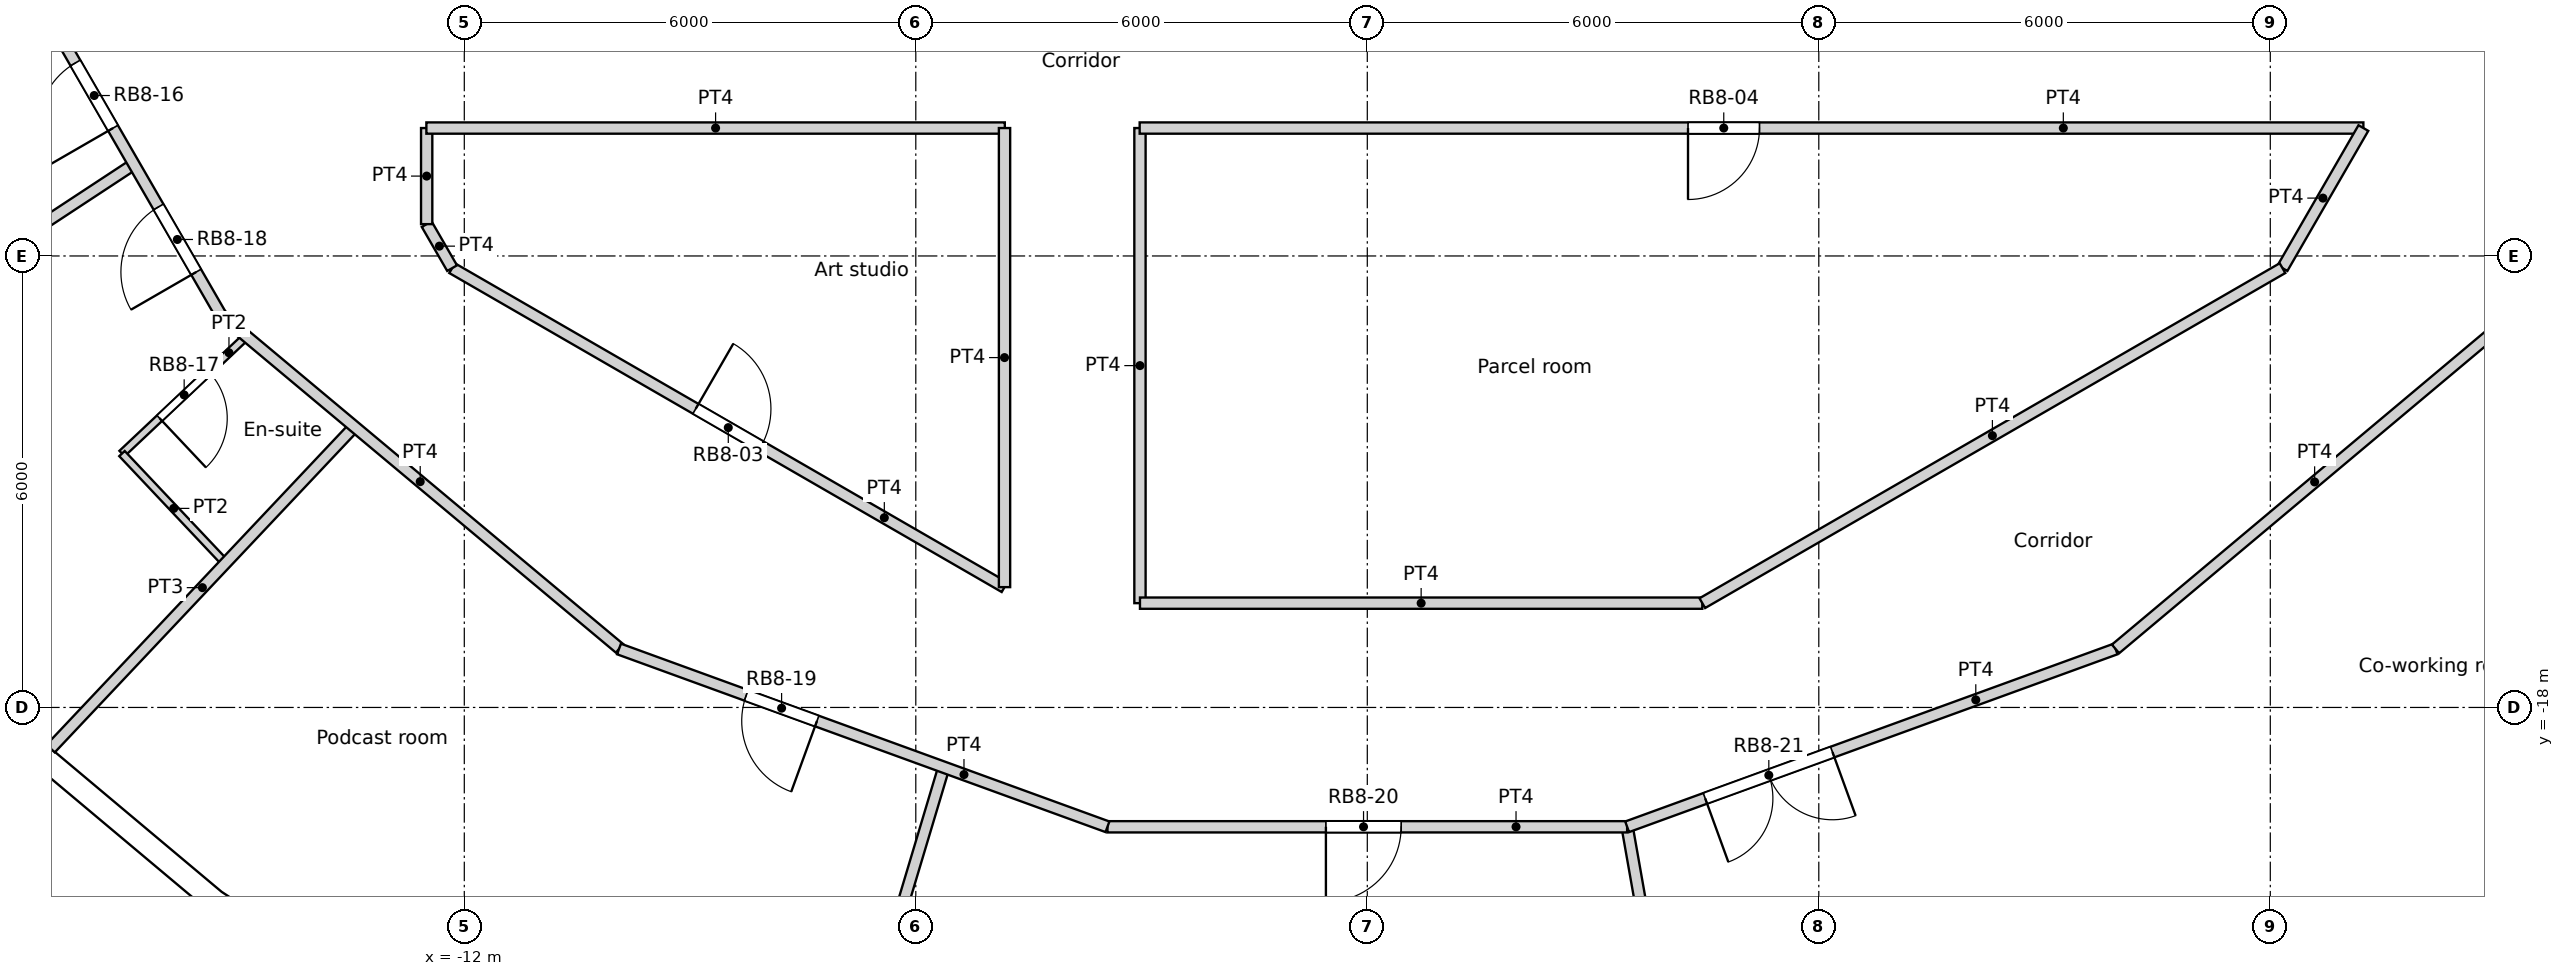
"""IFC4 building model, lengths in metres.
Left out: names, types, materials, properties, quantities, classifications, styles, units other than length and angle.
Written with IfcOpenShell. Run it as: python <this file> out.ifc"""

import sys

from ifc_helpers import new_model, si_unit, direction, frame, frame_2d, origin, origin_2d, place, context, subcontext, project, spatial, rectangle, circle, extrude, element, fill, save


model = new_model("IFC4")
c1 = context("Model", 3, precision=1e-05, world=origin(), true_north=direction((0.0, 1.0)))
c2 = subcontext(c1, "Body", "Model", "MODEL_VIEW")
j1 = project(units=[si_unit("LENGTHUNIT", "METRE"), si_unit("PLANEANGLEUNIT", "RADIAN")], contexts=[c1])
p1 = place(None, origin())
s1 = spatial("IfcSite", under=j1, at=p1, CompositionType="ELEMENT")
p2 = place(p1, origin())
s2 = spatial("IfcBuilding", under=s1, at=p2, CompositionType="ELEMENT")
p3 = place(p2, frame((0.0, 0.0, 201.6)))
s3 = spatial("IfcBuildingStorey", under=s2, at=p3, CompositionType="ELEMENT", Elevation=201.6)
for number, where, z_axis, x_axis in (
    (1, (-16.846, -17.855, 0.0), (0.0, 0.0, 1.0), (1.0, 0.0, 0.0)),
    (2, (14.659, -19.69, 0.0), (0.0, 0.0, 1.0), (1.0, 0.0, 0.0)),
):
    element("IfcColumn", number, at=place(p3, frame(where, z_axis=z_axis, x_axis=x_axis)), inside=s3, PredefinedType="COLUMN", context=c2, shape_type="SweptSolid", body=[
        extrude(circle(Radius=0.6, at=origin_2d()), origin(), (0.0, 0.0, 1.0), 3.6),
    ])
for number, where, z_axis, x_axis in (
    (3, (-13.798, -12.802, 0.0), (0.0, 0.0, 1.0), (1.0, 0.0, 0.0)),
    (4, (-9.411, -16.301, 0.0), (0.0, 0.0, 1.0), (1.0, 0.0, 0.0)),
    (5, (-4.188, -18.35, 0.0), (0.0, 0.0, 1.0), (1.0, 0.0, 0.0)),
    (6, (1.406, -18.77, 0.0), (0.0, 0.0, 1.0), (1.0, 0.0, 0.0)),
    (7, (6.876, -17.521, 0.0), (0.0, 0.0, 1.0), (1.0, 0.0, 0.0)),
    (8, (11.735, -14.716, 0.0), (0.0, 0.0, 1.0), (1.0, 0.0, 0.0)),
):
    element("IfcColumn", number, at=place(p3, frame(where, z_axis=z_axis, x_axis=x_axis)), inside=s3, PredefinedType="COLUMN", context=c2, shape_type="SweptSolid", body=[
        extrude(circle(Radius=0.65, at=origin_2d()), origin(), (0.0, 0.0, 1.0), 3.6),
    ])
p4 = place(p3, frame((-17.593, -18.661, 0.0), z_axis=(0.0, 0.0, 1.0), x_axis=(0.766008913364, -0.642829950023, 0.0)))
e9 = element("IfcWall", 9, at=p4, inside=s3, PredefinedType="SOLIDWALL", context=c2, shape_type="SweptSolid", body=[
    extrude(rectangle(XDim=2.973, YDim=0.3, at=frame_2d((1.486, 0.0))), origin(), (0.0, 0.0, 1.0), 3.3),
])
p5 = place(p4, frame((1.486, 0.0, 1.55)))
e10 = element("IfcOpeningElement", 10, at=p5, cuts=e9, PredefinedType="OPENING", context=c2, shape_type="SweptSolid", body=[
    extrude(circle(Radius=0.9, at=origin_2d()), frame((0.0, 0.16, 0.0), z_axis=(0.0, -1.0, 0.0), x_axis=(1.0, 0.0, 0.0)), (0.0, 0.0, 1.0), 0.32),
])
p6 = place(p3, frame((-15.316, -20.573, 0.0), z_axis=(0.0, 0.0, 1.0), x_axis=(0.835508361394, -0.54947773207, 0.0)))
e11 = element("IfcWall", 11, at=p6, inside=s3, PredefinedType="SOLIDWALL", context=c2, shape_type="SweptSolid", body=[
    extrude(rectangle(XDim=2.973, YDim=0.3, at=frame_2d((1.486, 0.0))), origin(), (0.0, 0.0, 1.0), 3.3),
])
p7 = place(p6, frame((1.486, 0.0, 1.55)))
e12 = element("IfcOpeningElement", 12, at=p7, cuts=e11, PredefinedType="OPENING", context=c2, shape_type="SweptSolid", body=[
    extrude(circle(Radius=0.9, at=origin_2d()), frame((0.0, 0.16, 0.0), z_axis=(0.0, -1.0, 0.0), x_axis=(1.0, 0.0, 0.0)), (0.0, 0.0, 1.0), 0.32),
])
p8 = place(p3, frame((13.132, -22.697, -0.3), z_axis=(0.0, 0.0, 1.0), x_axis=(0.835514416706, 0.549468524554, 0.0)))
e13 = element("IfcWall", 13, at=p8, inside=s3, PredefinedType="ELEMENTEDWALL", context=c2, shape_type="SweptSolid", body=[
    extrude(rectangle(XDim=3.0, YDim=1.45, at=frame_2d((1.5, 0.0))), origin(), (0.0, 0.0, 1.0), 3.6),
])
p9 = place(p8, frame((1.5, 0.0, 1.85)))
e14 = element("IfcOpeningElement", 14, at=p9, cuts=e13, PredefinedType="OPENING", context=c2, shape_type="SweptSolid", body=[
    extrude(circle(Radius=0.9, at=origin_2d()), frame((0.0, 0.735, 0.0), z_axis=(0.0, -1.0, 0.0), x_axis=(1.0, 0.0, 0.0)), (0.0, 0.0, 1.0), 1.47),
])
p10 = place(p3, frame((-12.504, -10.3, 0.0), z_axis=(0.0, 0.0, 1.0), x_axis=(1.0, 0.0, 0.0)))
e15 = element("IfcWall", 15, at=p10, inside=s3, PredefinedType="PARTITIONING", context=c2, shape_type="SweptSolid", body=[
    extrude(rectangle(XDim=7.687, YDim=0.15, at=frame_2d((3.844, 0.0))), origin(), (0.0, 0.0, 1.0), 3.3),
])
p11 = place(p3, frame((-3.025, -10.3, 0.0), z_axis=(0.0, 0.0, 1.0), x_axis=(1.0, 0.0, 0.0)))
e16 = element("IfcWall", 16, at=p11, inside=s3, PredefinedType="PARTITIONING", context=c2, shape_type="SweptSolid", body=[
    extrude(rectangle(XDim=16.262, YDim=0.15, at=frame_2d((8.131, 0.0))), origin(), (0.0, 0.0, 1.0), 3.3),
])
p12 = place(p11, frame((7.287, 0.0, 0.0)))
e17 = element("IfcOpeningElement", 17, at=p12, cuts=e16, PredefinedType="OPENING", context=c2, shape_type="SweptSolid", body=[
    extrude(rectangle(XDim=0.95, YDim=2.1, at=frame_2d((0.475, 1.05))), frame((0.0, 0.075, 0.0), z_axis=(0.0, -1.0, 0.0), x_axis=(1.0, 0.0, 0.0)), (0.0, 0.0, 1.0), 0.15),
])
p13 = place(p3, frame((12.162, -12.162, 0.0), z_axis=(0.0, 0.0, 1.0), x_axis=(0.499961633463, 0.866047553582, 0.0)))
e18 = element("IfcWall", 18, at=p13, inside=s3, PredefinedType="PARTITIONING", context=c2, shape_type="SweptSolid", body=[
    extrude(rectangle(XDim=2.15, YDim=0.15, at=frame_2d((1.075, 0.0))), origin(), (0.0, 0.0, 1.0), 3.3),
])
p14 = place(p3, frame((9.943, -17.222, 0.0), z_axis=(0.0, 0.0, 1.0), x_axis=(0.766192104565, 0.642611592567, 0.0)))
e19 = element("IfcWall", 19, at=p14, inside=s3, PredefinedType="PARTITIONING", context=c2, shape_type="SweptSolid", body=[
    extrude(rectangle(XDim=6.906, YDim=0.15, at=frame_2d((3.453, 0.0))), origin(), (0.0, 0.0, 1.0), 3.3),
])
p15 = place(p3, frame((-12.5, -11.577, 0.0), z_axis=(0.0, 0.0, 1.0), x_axis=(0.0, 1.0, 0.0)))
e20 = element("IfcWall", 20, at=p15, inside=s3, PredefinedType="PARTITIONING", context=c2, shape_type="SweptSolid", body=[
    extrude(rectangle(XDim=1.277, YDim=0.15, at=frame_2d((0.638, 0.0))), origin(), (0.0, 0.0, 1.0), 3.3),
])
p16 = place(p3, frame((-12.5, -11.577, 0.0), z_axis=(0.0, 0.0, 1.0), x_axis=(0.500024767483, -0.866011103799, 0.0)))
e21 = element("IfcWall", 21, at=p16, inside=s3, PredefinedType="PARTITIONING", context=c2, shape_type="SweptSolid", body=[
    extrude(rectangle(XDim=0.676, YDim=0.15, at=frame_2d((0.338, 0.0))), origin(), (0.0, 0.0, 1.0), 3.3),
])
p17 = place(p3, frame((-18.688, -6.802, 0.0), z_axis=(0.0, 0.0, 1.0), x_axis=(0.500009041241, -0.866020183759, 0.0)))
e22 = element("IfcWall", 22, at=p17, inside=s3, PredefinedType="PARTITIONING", context=c2, shape_type="SweptSolid", body=[
    extrude(rectangle(XDim=6.907, YDim=0.15, at=frame_2d((3.454, 0.0))), origin(), (0.0, 0.0, 1.0), 3.3),
])
p18 = place(p17, frame((3.04, 0.0, 0.0)))
e23 = element("IfcOpeningElement", 23, at=p18, cuts=e22, PredefinedType="OPENING", context=c2, shape_type="SweptSolid", body=[
    extrude(rectangle(XDim=1.0, YDim=2.1, at=frame_2d((0.5, 1.05))), frame((0.0, 0.075, 0.0), z_axis=(0.0, -1.0, 0.0), x_axis=(1.0, 0.0, 0.0)), (0.0, 0.0, 1.0), 0.15),
])
p19 = place(p17, frame((5.249, 0.0, 0.0)))
e24 = element("IfcOpeningElement", 24, at=p19, cuts=e22, PredefinedType="OPENING", context=c2, shape_type="SweptSolid", body=[
    extrude(rectangle(XDim=1.0, YDim=2.1, at=frame_2d((0.5, 1.05))), frame((0.0, 0.075, 0.0), z_axis=(0.0, -1.0, 0.0), x_axis=(1.0, 0.0, 0.0)), (0.0, 0.0, 1.0), 0.15),
])
p20 = place(p3, frame((-15.235, -12.784, 0.0), z_axis=(0.0, 0.0, 1.0), x_axis=(0.767110396068, -0.641515113029, 0.0)))
e25 = element("IfcWall", 25, at=p20, inside=s3, PredefinedType="PARTITIONING", context=c2, shape_type="SweptSolid", body=[
    extrude(rectangle(XDim=6.906, YDim=0.15, at=frame_2d((3.453, 0.0))), origin(), (0.0, 0.0, 1.0), 3.3),
])
p21 = place(p3, frame((-12.162, -12.162, 0.0), z_axis=(0.0, 0.0, 1.0), x_axis=(0.866004766557, -0.500035743023, 0.0)))
e26 = element("IfcWall", 26, at=p21, inside=s3, PredefinedType="PARTITIONING", context=c2, shape_type="SweptSolid", body=[
    extrude(rectangle(XDim=8.477, YDim=0.15, at=frame_2d((4.239, 0.0))), origin(), (0.0, 0.0, 1.0), 3.3),
])
p22 = place(p21, frame((3.738, 0.0, 0.0)))
e27 = element("IfcOpeningElement", 27, at=p22, cuts=e26, PredefinedType="OPENING", context=c2, shape_type="SweptSolid", body=[
    extrude(rectangle(XDim=1.0, YDim=2.04, at=frame_2d((0.5, 1.02))), frame((0.0, 0.075, 0.0), z_axis=(0.0, -1.0, 0.0), x_axis=(1.0, 0.0, 0.0)), (0.0, 0.0, 1.0), 0.15),
])
p23 = place(p3, frame((-4.821, -16.401, 0.0), z_axis=(0.0, 0.0, 1.0), x_axis=(0.0, 1.0, 0.0)))
e28 = element("IfcWall", 28, at=p23, inside=s3, PredefinedType="PARTITIONING", context=c2, shape_type="SweptSolid", body=[
    extrude(rectangle(XDim=6.101, YDim=0.15, at=frame_2d((3.05, 0.0))), origin(), (0.0, 0.0, 1.0), 3.3),
])
p24 = place(p3, frame((-3.021, -16.614, 0.0), z_axis=(0.0, 0.0, 1.0), x_axis=(0.0, 1.0, 0.0)))
e29 = element("IfcWall", 29, at=p24, inside=s3, PredefinedType="PARTITIONING", context=c2, shape_type="SweptSolid", body=[
    extrude(rectangle(XDim=6.314, YDim=0.15, at=frame_2d((3.157, 0.0))), origin(), (0.0, 0.0, 1.0), 3.3),
])
p25 = place(p3, frame((-3.021, -16.614, 0.0), z_axis=(0.0, 0.0, 1.0), x_axis=(1.0, 0.0, 0.0)))
e30 = element("IfcWall", 30, at=p25, inside=s3, PredefinedType="PARTITIONING", context=c2, shape_type="SweptSolid", body=[
    extrude(rectangle(XDim=7.473, YDim=0.15, at=frame_2d((3.736, 0.0))), origin(), (0.0, 0.0, 1.0), 3.3),
])
p26 = place(p3, frame((4.452, -16.614, 0.0), z_axis=(0.0, 0.0, 1.0), x_axis=(0.866005203721, 0.500034985904, 0.0)))
e31 = element("IfcWall", 31, at=p26, inside=s3, PredefinedType="PARTITIONING", context=c2, shape_type="SweptSolid", body=[
    extrude(rectangle(XDim=8.903, YDim=0.15, at=frame_2d((4.452, 0.0))), origin(), (0.0, 0.0, 1.0), 3.3),
])
p27 = place(p3, frame((-9.944, -17.223, 0.0), z_axis=(0.0, 0.0, 1.0), x_axis=(0.939672634566, -0.342075050021, 0.0)))
e32 = element("IfcWall", 32, at=p27, inside=s3, PredefinedType="PARTITIONING", context=c2, shape_type="SweptSolid", body=[
    extrude(rectangle(XDim=6.908, YDim=0.15, at=frame_2d((3.454, 0.0))), origin(), (0.0, 0.0, 1.0), 3.3),
])
p28 = place(p27, frame((1.799, 0.0, 0.0)))
e33 = element("IfcOpeningElement", 33, at=p28, cuts=e32, PredefinedType="OPENING", context=c2, shape_type="SweptSolid", body=[
    extrude(rectangle(XDim=1.0, YDim=2.04, at=frame_2d((0.5, 1.02))), frame((0.0, 0.075, 0.0), z_axis=(0.0, -1.0, 0.0), x_axis=(1.0, 0.0, 0.0)), (0.0, 0.0, 1.0), 0.15),
])
p29 = place(p3, frame((-3.453, -19.586, 0.0), z_axis=(0.0, 0.0, 1.0), x_axis=(1.0, 0.0, 0.0)))
e34 = element("IfcWall", 34, at=p29, inside=s3, PredefinedType="PARTITIONING", context=c2, shape_type="SweptSolid", body=[
    extrude(rectangle(XDim=6.906, YDim=0.15, at=frame_2d((3.453, 0.0))), origin(), (0.0, 0.0, 1.0), 3.3),
])
p30 = place(p29, frame((2.903, 0.0, 0.0)))
e35 = element("IfcOpeningElement", 35, at=p30, cuts=e34, PredefinedType="OPENING", context=c2, shape_type="SweptSolid", body=[
    extrude(rectangle(XDim=1.0, YDim=2.04, at=frame_2d((0.5, 1.02))), frame((0.0, 0.075, 0.0), z_axis=(0.0, -1.0, 0.0), x_axis=(1.0, 0.0, 0.0)), (0.0, 0.0, 1.0), 0.15),
])
p31 = place(p3, frame((3.453, -19.586, 0.0), z_axis=(0.0, 0.0, 1.0), x_axis=(0.939672634566, 0.342075050021, 0.0)))
e36 = element("IfcWall", 36, at=p31, inside=s3, PredefinedType="PARTITIONING", context=c2, shape_type="SweptSolid", body=[
    extrude(rectangle(XDim=6.908, YDim=0.15, at=frame_2d((3.454, 0.0))), origin(), (0.0, 0.0, 1.0), 3.3),
])
p32 = place(p31, frame((1.104, 0.0, 0.0)))
e37 = element("IfcOpeningElement", 37, at=p32, cuts=e36, PredefinedType="OPENING", context=c2, shape_type="SweptSolid", body=[
    extrude(rectangle(XDim=1.8, YDim=2.1, at=frame_2d((0.9, 1.05))), frame((0.0, 0.075, 0.0), z_axis=(0.0, -1.0, 0.0), x_axis=(1.0, 0.0, 0.0)), (0.0, 0.0, 1.0), 0.15),
])
p33 = place(p3, frame((-21.303, -14.011, 0.0), z_axis=(0.0, 0.0, 1.0), x_axis=(0.835534987945, 0.54943724293, 0.0)))
e38 = element("IfcWall", 38, at=p33, inside=s3, PredefinedType="PARTITIONING", context=c2, shape_type="SweptSolid", body=[
    extrude(rectangle(XDim=5.879, YDim=0.15, at=frame_2d((2.939, 0.0))), origin(), (0.0, 0.0, 1.0), 3.3),
])
p34 = place(p3, frame((-16.549, -14.626, 0.0), z_axis=(0.0, 0.0, 1.0), x_axis=(0.727754926423, 0.68583727448, 0.0)))
e39 = element("IfcWall", 39, at=p34, inside=s3, PredefinedType="PARTITIONING", context=c2, shape_type="SweptSolid", body=[
    extrude(rectangle(XDim=2.271, YDim=0.1, at=frame_2d((1.136, 0.0))), origin(), (0.0, 0.0, 1.0), 3.3),
])
p35 = place(p34, frame((0.686, 0.0, 0.0)))
e40 = element("IfcOpeningElement", 40, at=p35, cuts=e39, PredefinedType="OPENING", context=c2, shape_type="SweptSolid", body=[
    extrude(rectangle(XDim=0.9, YDim=2.04, at=frame_2d((0.45, 1.02))), frame((0.0, 0.05, 0.0), z_axis=(0.0, -1.0, 0.0), x_axis=(1.0, 0.0, 0.0)), (0.0, 0.0, 1.0), 0.1),
])
p36 = place(p3, frame((-16.549, -14.626, 0.0), z_axis=(0.0, 0.0, 1.0), x_axis=(0.686337209023, -0.727283462971, 0.0)))
e41 = element("IfcWall", 41, at=p36, inside=s3, PredefinedType="PARTITIONING", context=c2, shape_type="SweptSolid", body=[
    extrude(rectangle(XDim=2.003, YDim=0.1, at=frame_2d((1.002, 0.0))), origin(), (0.0, 0.0, 1.0), 3.3),
])
p37 = place(p3, frame((-17.497, -18.546, 0.0), z_axis=(0.0, 0.0, 1.0), x_axis=(0.68614289064, 0.727466792111, 0.0)))
e42 = element("IfcWall", 42, at=p37, inside=s3, PredefinedType="PARTITIONING", context=c2, shape_type="SweptSolid", body=[
    extrude(rectangle(XDim=5.878, YDim=0.15, at=frame_2d((2.939, 0.0))), origin(), (0.0, 0.0, 1.0), 3.3),
])
p38 = place(p3, frame((-7.313, -24.426, 0.0), z_axis=(0.0, 0.0, 1.0), x_axis=(0.286833432865, 0.957980470464, 0.0)))
e43 = element("IfcWall", 43, at=p38, inside=s3, PredefinedType="PARTITIONING", context=c2, shape_type="SweptSolid", body=[
    extrude(rectangle(XDim=5.878, YDim=0.15, at=frame_2d((2.939, 0.0))), origin(), (0.0, 0.0, 1.0), 3.3),
])
p39 = place(p3, frame((3.453, -19.586, 0.0), z_axis=(0.0, 0.0, 1.0), x_axis=(0.17382754149, -0.984776109489, 0.0)))
e44 = element("IfcWall", 44, at=p39, inside=s3, PredefinedType="PARTITIONING", context=c2, shape_type="SweptSolid", body=[
    extrude(rectangle(XDim=5.61, YDim=0.15, at=frame_2d((2.805, 0.0))), origin(), (0.0, 0.0, 1.0), 3.3),
])
p40 = place(p5, origin())
e45 = element("IfcWindow", 45, at=p40, inside=s3, PartitioningType="SINGLE_PANEL", PredefinedType="WINDOW", context=c2, shape_type="SweptSolid", body=[
    extrude(circle(Radius=0.9, at=origin_2d()), frame((0.0, 0.12, 0.0), z_axis=(0.0, -1.0, 0.0), x_axis=(1.0, 0.0, 0.0)), (0.0, 0.0, 1.0), 0.1),
])
fill(e10, e45)
p41 = place(p22, origin())
e46 = element("IfcDoor", 46, at=p41, inside=s3, OperationType="SINGLE_SWING_LEFT", PredefinedType="DOOR", context=c2, shape_type="SweptSolid", body=[
    extrude(rectangle(XDim=1.0, YDim=2.04, at=frame_2d((0.5, 1.02))), frame((0.0, 0.025, 0.0), z_axis=(0.0, -1.0, 0.0), x_axis=(1.0, 0.0, 0.0)), (0.0, 0.0, 1.0), 0.05),
])
fill(e27, e46)
p42 = place(p12, origin())
e47 = element("IfcDoor", 47, at=p42, inside=s3, OperationType="SINGLE_SWING_RIGHT", PredefinedType="DOOR", context=c2, shape_type="SweptSolid", body=[
    extrude(rectangle(XDim=0.95, YDim=2.1, at=frame_2d((0.475, 1.05))), frame((0.0, 0.025, 0.0), z_axis=(0.0, -1.0, 0.0), x_axis=(1.0, 0.0, 0.0)), (0.0, 0.0, 1.0), 0.05),
])
fill(e17, e47)
p43 = place(p18, origin())
e48 = element("IfcDoor", 48, at=p43, inside=s3, OperationType="SINGLE_SWING_LEFT", PredefinedType="DOOR", context=c2, shape_type="SweptSolid", body=[
    extrude(rectangle(XDim=1.0, YDim=2.1, at=frame_2d((0.5, 1.05))), frame((0.0, 0.025, 0.0), z_axis=(0.0, -1.0, 0.0), x_axis=(1.0, 0.0, 0.0)), (0.0, 0.0, 1.0), 0.05),
])
fill(e23, e48)
p44 = place(p35, origin())
e49 = element("IfcDoor", 49, at=p44, inside=s3, OperationType="SINGLE_SWING_RIGHT", PredefinedType="DOOR", context=c2, shape_type="SweptSolid", body=[
    extrude(rectangle(XDim=0.9, YDim=2.04, at=frame_2d((0.45, 1.02))), frame((0.0, 0.025, 0.0), z_axis=(0.0, -1.0, 0.0), x_axis=(1.0, 0.0, 0.0)), (0.0, 0.0, 1.0), 0.05),
])
fill(e40, e49)
p45 = place(p19, origin())
e50 = element("IfcDoor", 50, at=p45, inside=s3, OperationType="SINGLE_SWING_LEFT", PredefinedType="DOOR", context=c2, shape_type="SweptSolid", body=[
    extrude(rectangle(XDim=1.0, YDim=2.1, at=frame_2d((0.5, 1.05))), frame((0.0, 0.025, 0.0), z_axis=(0.0, -1.0, 0.0), x_axis=(1.0, 0.0, 0.0)), (0.0, 0.0, 1.0), 0.05),
])
fill(e24, e50)
p46 = place(p28, origin())
e51 = element("IfcDoor", 51, at=p46, inside=s3, OperationType="SINGLE_SWING_LEFT", PredefinedType="DOOR", context=c2, shape_type="SweptSolid", body=[
    extrude(rectangle(XDim=1.0, YDim=2.04, at=frame_2d((0.5, 1.02))), frame((0.0, 0.025, 0.0), z_axis=(0.0, -1.0, 0.0), x_axis=(1.0, 0.0, 0.0)), (0.0, 0.0, 1.0), 0.05),
])
fill(e33, e51)
p47 = place(p30, origin())
e52 = element("IfcDoor", 52, at=p47, inside=s3, OperationType="SINGLE_SWING_RIGHT", PredefinedType="DOOR", context=c2, shape_type="SweptSolid", body=[
    extrude(rectangle(XDim=1.0, YDim=2.04, at=frame_2d((0.5, 1.02))), frame((0.0, 0.025, 0.0), z_axis=(0.0, -1.0, 0.0), x_axis=(1.0, 0.0, 0.0)), (0.0, 0.0, 1.0), 0.05),
])
fill(e35, e52)
p48 = place(p32, origin())
e53 = element("IfcDoor", 53, at=p48, inside=s3, OperationType="DOUBLE_DOOR_SINGLE_SWING", PredefinedType="DOOR", context=c2, shape_type="SweptSolid", body=[
    extrude(rectangle(XDim=1.8, YDim=2.1, at=frame_2d((0.9, 1.05))), frame((0.0, 0.025, 0.0), z_axis=(0.0, -1.0, 0.0), x_axis=(1.0, 0.0, 0.0)), (0.0, 0.0, 1.0), 0.05),
])
fill(e37, e53)
save(model, sys.argv[1])
